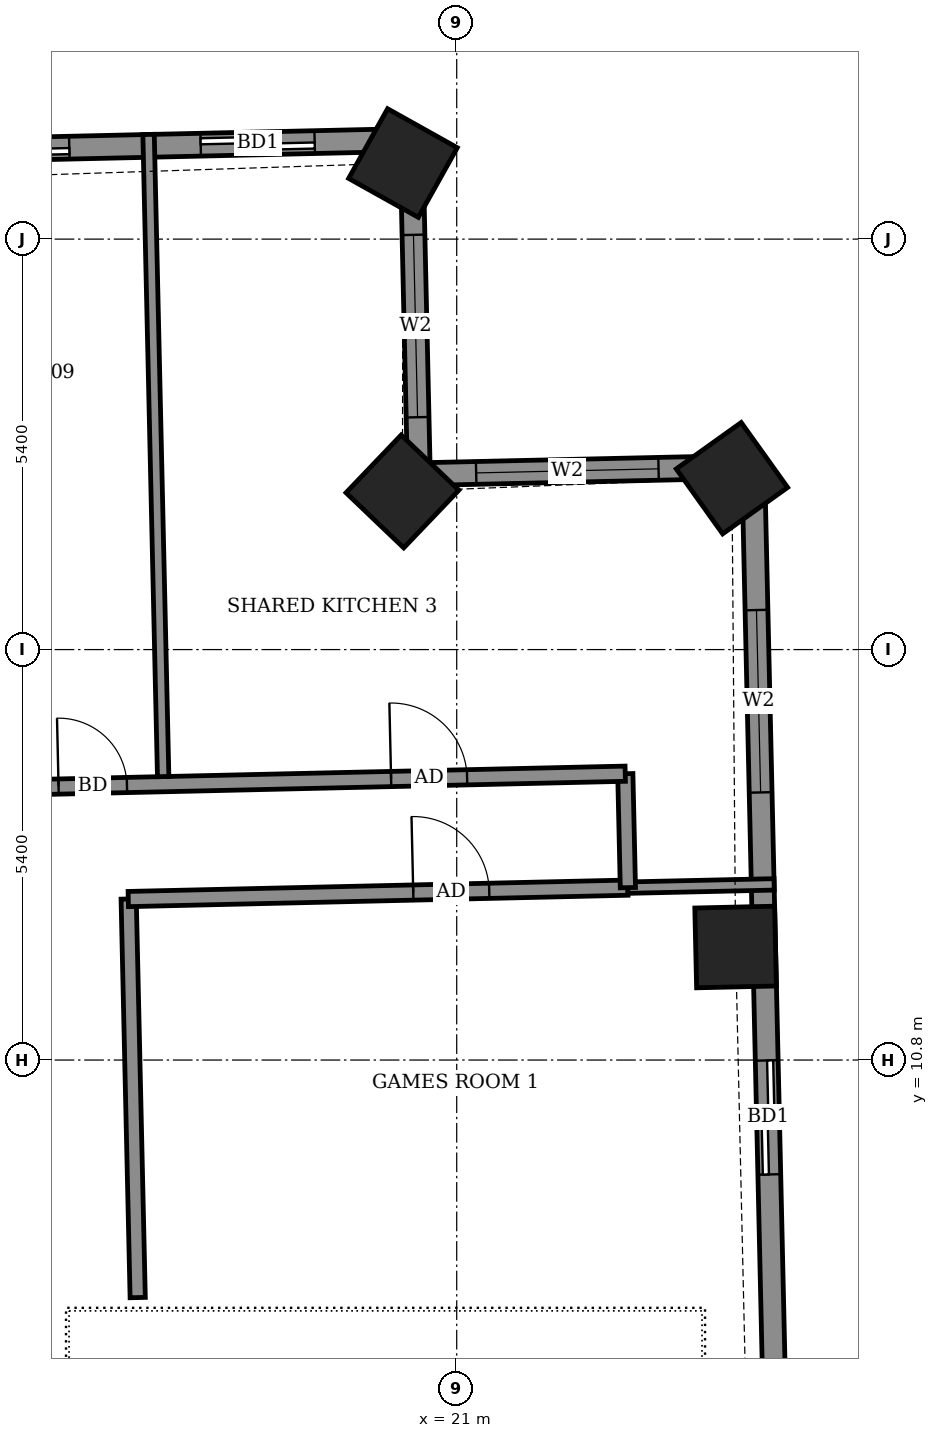
"""IFC4 building model, lengths in metres.
Left out: names, types, materials, properties, quantities, classifications, styles, units other than length and angle.
Written with IfcOpenShell. Run it as: python <this file> out.ifc"""

import sys

from ifc_helpers import new_model, si_unit, direction, frame, frame_2d, origin, origin_2d, place, context, subcontext, project, spatial, rectangle, extrude, element, fill, save


model = new_model("IFC4")
c1 = context("Model", 3, precision=1e-05, world=origin(), true_north=direction((0.0, 1.0)))
c2 = subcontext(c1, "Body", "Model", "MODEL_VIEW")
j1 = project(units=[si_unit("LENGTHUNIT", "METRE"), si_unit("PLANEANGLEUNIT", "RADIAN")], contexts=[c1])
p1 = place(None, origin())
s1 = spatial("IfcSite", under=j1, at=p1, CompositionType="ELEMENT")
p2 = place(p1, origin())
s2 = spatial("IfcBuilding", under=s1, at=p2, CompositionType="ELEMENT")
p3 = place(p2, frame((0.0, 0.0, 245.5)))
s3 = spatial("IfcBuildingStorey", under=s2, at=p3, CompositionType="ELEMENT", Elevation=245.5)
for number, where, z_axis, x_axis in (
    (1, (24.669, 12.287, -0.55), (0.0, 0.0, 1.0), (-0.023, 1.0, 0.0)),
    (2, (24.621, 18.455, -0.55), (0.0, 0.0, 1.0), (-0.581, 0.814, 0.0)),
    (3, (20.286, 18.281, -0.55), (0.0, 0.0, 1.0), (-0.723, 0.691, 0.0)),
    (4, (20.293, 22.601, -0.55), (0.0, 0.0, 1.0), (-0.873, 0.488, 0.0)),
):
    element("IfcColumn", number, at=place(p3, frame(where, z_axis=z_axis, x_axis=x_axis)), inside=s3, PredefinedType="COLUMN", context=c2, shape_type="SweptSolid", body=[
        extrude(rectangle(XDim=1.05, YDim=1.05, at=origin_2d()), origin(), (0.0, 0.0, 1.0), 3.6),
    ])
p4 = place(p3, frame((25.203, 5.31, 0.0), z_axis=(0.0, 0.0, 1.0), x_axis=(-0.022708061432, 0.999742138727, 0.0)))
e5 = element("IfcWall", 5, at=p4, inside=s3, PredefinedType="SOLIDWALL", context=c2, shape_type="SweptSolid", body=[
    extrude(rectangle(XDim=13.299, YDim=0.3, at=frame_2d((6.65, 0.0))), origin(), (0.0, 0.0, 1.0), 2.55),
])
p5 = place(p4, frame((3.986, 0.0, 0.0)))
e6 = element("IfcOpeningElement", 6, at=p5, cuts=e5, PredefinedType="OPENING", context=c2, shape_type="SweptSolid", body=[
    extrude(rectangle(XDim=1.5, YDim=2.4, at=frame_2d((0.75, 1.2))), frame((0.0, 0.16, 0.0), z_axis=(0.0, -1.0, 0.0), x_axis=(1.0, 0.0, 0.0)), (0.0, 0.0, 1.0), 0.32),
])
p6 = place(p4, frame((9.013, 0.0, 0.9)))
e7 = element("IfcOpeningElement", 7, at=p6, cuts=e5, PredefinedType="OPENING", context=c2, shape_type="SweptSolid", body=[
    extrude(rectangle(XDim=2.4, YDim=1.5, at=frame_2d((1.2, 0.75))), frame((0.0, 0.16, 0.0), z_axis=(0.0, -1.0, 0.0), x_axis=(1.0, 0.0, 0.0)), (0.0, 0.0, 1.0), 0.32),
])
p7 = place(p3, frame((24.901, 18.606, 0.0), z_axis=(0.0, 0.0, 1.0), x_axis=(-0.999747476176, -0.022471846368, 0.0)))
e8 = element("IfcWall", 8, at=p7, inside=s3, PredefinedType="SOLIDWALL", context=c2, shape_type="SweptSolid", body=[
    extrude(rectangle(XDim=4.4, YDim=0.3, at=frame_2d((2.2, 0.0))), origin(), (0.0, 0.0, 1.0), 2.55),
])
p8 = place(p7, frame((1.246, 0.0, 0.9)))
e9 = element("IfcOpeningElement", 9, at=p8, cuts=e8, PredefinedType="OPENING", context=c2, shape_type="SweptSolid", body=[
    extrude(rectangle(XDim=2.4, YDim=1.5, at=frame_2d((1.2, 0.75))), frame((0.0, 0.16, 0.0), z_axis=(0.0, -1.0, 0.0), x_axis=(1.0, 0.0, 0.0)), (0.0, 0.0, 1.0), 0.32),
])
p9 = place(p3, frame((20.502, 18.507, 0.0), z_axis=(0.0, 0.0, 1.0), x_axis=(-0.02247683371, 0.999747364061, 0.0)))
e10 = element("IfcWall", 10, at=p9, inside=s3, PredefinedType="SOLIDWALL", context=c2, shape_type="SweptSolid", body=[
    extrude(rectangle(XDim=4.399, YDim=0.3, at=frame_2d((2.2, 0.0))), origin(), (0.0, 0.0, 1.0), 2.55),
])
p10 = place(p9, frame((0.75, 0.0, 0.9)))
e11 = element("IfcOpeningElement", 11, at=p10, cuts=e10, PredefinedType="OPENING", context=c2, shape_type="SweptSolid", body=[
    extrude(rectangle(XDim=2.4, YDim=1.5, at=frame_2d((1.2, 0.75))), frame((0.0, 0.16, 0.0), z_axis=(0.0, -1.0, 0.0), x_axis=(1.0, 0.0, 0.0)), (0.0, 0.0, 1.0), 0.32),
])
p11 = place(p3, frame((20.403, 22.905, 0.0), z_axis=(0.0, 0.0, 1.0), x_axis=(-0.99974298964, -0.022670568288, 0.0)))
e12 = element("IfcWall", 12, at=p11, inside=s3, PredefinedType="SOLIDWALL", context=c2, shape_type="SweptSolid", body=[
    extrude(rectangle(XDim=44.509, YDim=0.3, at=frame_2d((22.254, 0.0))), origin(), (0.0, 0.0, 1.0), 2.5),
])
p12 = place(p11, frame((1.272, 0.0, 0.0)))
e13 = element("IfcOpeningElement", 13, at=p12, cuts=e12, PredefinedType="OPENING", context=c2, shape_type="SweptSolid", body=[
    extrude(rectangle(XDim=1.5, YDim=2.4, at=frame_2d((0.75, 1.2))), frame((0.0, 0.16, 0.0), z_axis=(0.0, -1.0, 0.0), x_axis=(1.0, 0.0, 0.0)), (0.0, 0.0, 1.0), 0.32),
])
p13 = place(p11, frame((4.501, 0.0, 0.0)))
e14 = element("IfcOpeningElement", 14, at=p13, cuts=e12, PredefinedType="OPENING", context=c2, shape_type="SweptSolid", body=[
    extrude(rectangle(XDim=1.5, YDim=2.4, at=frame_2d((0.75, 1.2))), frame((0.0, 0.16, 0.0), z_axis=(0.0, -1.0, 0.0), x_axis=(1.0, 0.0, 0.0)), (0.0, 0.0, 1.0), 0.32),
])
p14 = place(p11, frame((9.058, 0.0, 0.0)))
e15 = element("IfcOpeningElement", 15, at=p14, cuts=e12, PredefinedType="OPENING", context=c2, shape_type="SweptSolid", body=[
    extrude(rectangle(XDim=1.5, YDim=2.4, at=frame_2d((0.75, 1.2))), frame((0.0, 0.16, 0.0), z_axis=(0.0, -1.0, 0.0), x_axis=(1.0, 0.0, 0.0)), (0.0, 0.0, 1.0), 0.32),
])
p15 = place(p11, frame((12.46, 0.0, 0.0)))
e16 = element("IfcOpeningElement", 16, at=p15, cuts=e12, PredefinedType="OPENING", context=c2, shape_type="SweptSolid", body=[
    extrude(rectangle(XDim=1.5, YDim=2.4, at=frame_2d((0.75, 1.2))), frame((0.0, 0.16, 0.0), z_axis=(0.0, -1.0, 0.0), x_axis=(1.0, 0.0, 0.0)), (0.0, 0.0, 1.0), 0.32),
])
p16 = place(p11, frame((17.533, 0.0, 0.0)))
e17 = element("IfcOpeningElement", 17, at=p16, cuts=e12, PredefinedType="OPENING", context=c2, shape_type="SweptSolid", body=[
    extrude(rectangle(XDim=1.5, YDim=2.4, at=frame_2d((0.75, 1.2))), frame((0.0, 0.16, 0.0), z_axis=(0.0, -1.0, 0.0), x_axis=(1.0, 0.0, 0.0)), (0.0, 0.0, 1.0), 0.32),
])
p17 = place(p11, frame((22.993, 0.0, 0.0)))
e18 = element("IfcOpeningElement", 18, at=p17, cuts=e12, PredefinedType="OPENING", context=c2, shape_type="SweptSolid", body=[
    extrude(rectangle(XDim=1.2, YDim=2.4, at=frame_2d((0.6, 1.2))), frame((0.0, 0.16, 0.0), z_axis=(0.0, -1.0, 0.0), x_axis=(1.0, 0.0, 0.0)), (0.0, 0.0, 1.0), 0.32),
])
p18 = place(p11, frame((26.033, 0.0, 0.0)))
e19 = element("IfcOpeningElement", 19, at=p18, cuts=e12, PredefinedType="OPENING", context=c2, shape_type="SweptSolid", body=[
    extrude(rectangle(XDim=1.5, YDim=2.4, at=frame_2d((0.75, 1.2))), frame((0.0, 0.16, 0.0), z_axis=(0.0, -1.0, 0.0), x_axis=(1.0, 0.0, 0.0)), (0.0, 0.0, 1.0), 0.32),
])
p19 = place(p11, frame((30.827, 0.0, 0.0)))
e20 = element("IfcOpeningElement", 20, at=p19, cuts=e12, PredefinedType="OPENING", context=c2, shape_type="SweptSolid", body=[
    extrude(rectangle(XDim=1.5, YDim=2.4, at=frame_2d((0.75, 1.2))), frame((0.0, 0.16, 0.0), z_axis=(0.0, -1.0, 0.0), x_axis=(1.0, 0.0, 0.0)), (0.0, 0.0, 1.0), 0.32),
])
p20 = place(p11, frame((34.286, 0.0, 0.0)))
e21 = element("IfcOpeningElement", 21, at=p20, cuts=e12, PredefinedType="OPENING", context=c2, shape_type="SweptSolid", body=[
    extrude(rectangle(XDim=1.5, YDim=2.4, at=frame_2d((0.75, 1.2))), frame((0.0, 0.16, 0.0), z_axis=(0.0, -1.0, 0.0), x_axis=(1.0, 0.0, 0.0)), (0.0, 0.0, 1.0), 0.32),
])
p21 = place(p11, frame((38.811, 0.0, 0.0)))
e22 = element("IfcOpeningElement", 22, at=p21, cuts=e12, PredefinedType="OPENING", context=c2, shape_type="SweptSolid", body=[
    extrude(rectangle(XDim=1.5, YDim=2.4, at=frame_2d((0.75, 1.2))), frame((0.0, 0.16, 0.0), z_axis=(0.0, -1.0, 0.0), x_axis=(1.0, 0.0, 0.0)), (0.0, 0.0, 1.0), 0.32),
])
p22 = place(p11, frame((42.148, 0.0, 0.9)))
e23 = element("IfcOpeningElement", 23, at=p22, cuts=e12, PredefinedType="OPENING", context=c2, shape_type="SweptSolid", body=[
    extrude(rectangle(XDim=1.2, YDim=1.5, at=frame_2d((0.6, 0.75))), frame((0.0, 0.16, 0.0), z_axis=(0.0, -1.0, 0.0), x_axis=(1.0, 0.0, 0.0)), (0.0, 0.0, 1.0), 0.32),
])
p23 = place(p3, frame((16.803, 7.675, 0.0), z_axis=(0.0, 0.0, 1.0), x_axis=(-0.022667483124, 0.999743059595, 0.0)))
e24 = element("IfcWall", 24, at=p23, inside=s3, PredefinedType="PARTITIONING", context=c2, shape_type="SweptSolid", body=[
    extrude(rectangle(XDim=5.245, YDim=0.2, at=frame_2d((2.623, 0.0))), origin(), (0.0, 0.0, 1.0), 3.05),
])
p24 = place(p3, frame((16.679, 12.918, 0.0), z_axis=(0.0, 0.0, 1.0), x_axis=(0.999739125025, 0.022840356696, 0.0)))
e25 = element("IfcWall", 25, at=p24, inside=s3, PredefinedType="PARTITIONING", context=c2, shape_type="SweptSolid", body=[
    extrude(rectangle(XDim=6.574, YDim=0.2, at=frame_2d((3.287, 0.0))), origin(), (0.0, 0.0, 1.0), 3.05),
])
p25 = place(p24, frame((3.75, 0.0, 0.0)))
e26 = element("IfcOpeningElement", 26, at=p25, cuts=e25, PredefinedType="OPENING", context=c2, shape_type="SweptSolid", body=[
    extrude(rectangle(XDim=1.0, YDim=2.1, at=frame_2d((0.5, 1.05))), frame((0.0, 0.11, 0.0), z_axis=(0.0, -1.0, 0.0), x_axis=(1.0, 0.0, 0.0)), (0.0, 0.0, 1.0), 0.22),
])
p26 = place(p3, frame((23.251, 13.068, 0.0), z_axis=(0.0, 0.0, 1.0), x_axis=(0.999750982596, 0.022315304114, 0.0)))
e27 = element("IfcWall", 27, at=p26, inside=s3, PredefinedType="PARTITIONING", context=c2, shape_type="SweptSolid", body=[
    extrude(rectangle(XDim=1.926, YDim=0.15, at=frame_2d((0.963, 0.0))), origin(), (0.0, 0.0, 1.0), 2.55),
])
p27 = place(p3, frame((23.252, 13.068, 0.0), z_axis=(0.0, 0.0, 1.0), x_axis=(-0.022636322434, 0.999743765625, 0.0)))
e28 = element("IfcWall", 28, at=p27, inside=s3, PredefinedType="PARTITIONING", context=c2, shape_type="SweptSolid", body=[
    extrude(rectangle(XDim=1.499, YDim=0.2, at=frame_2d((0.75, 0.0))), origin(), (0.0, 0.0, 1.0), 3.05),
])
p28 = place(p3, frame((-27.652, 13.413, 0.0), z_axis=(0.0, 0.0, 1.0), x_axis=(0.999742864992, 0.022676064408, 0.0)))
e29 = element("IfcWall", 29, at=p28, inside=s3, PredefinedType="PARTITIONING", context=c2, shape_type="SweptSolid", body=[
    extrude(rectangle(XDim=50.882, YDim=0.2, at=frame_2d((25.441, 0.0))), origin(), (0.0, 0.0, 1.0), 3.05),
])
p29 = place(p28, frame((47.801, 0.0, 0.0)))
e30 = element("IfcOpeningElement", 30, at=p29, cuts=e29, PredefinedType="OPENING", context=c2, shape_type="SweptSolid", body=[
    extrude(rectangle(XDim=1.0, YDim=2.1, at=frame_2d((0.5, 1.05))), frame((0.0, 0.11, 0.0), z_axis=(0.0, -1.0, 0.0), x_axis=(1.0, 0.0, 0.0)), (0.0, 0.0, 1.0), 0.22),
])
p30 = place(p28, frame((43.425, 0.0, 0.0)))
e31 = element("IfcOpeningElement", 31, at=p30, cuts=e29, PredefinedType="OPENING", context=c2, shape_type="SweptSolid", body=[
    extrude(rectangle(XDim=0.9, YDim=2.1, at=frame_2d((0.45, 1.05))), frame((0.0, 0.11, 0.0), z_axis=(0.0, -1.0, 0.0), x_axis=(1.0, 0.0, 0.0)), (0.0, 0.0, 1.0), 0.22),
])
p31 = place(p28, frame((36.8, 0.0, 0.0)))
e32 = element("IfcOpeningElement", 32, at=p31, cuts=e29, PredefinedType="OPENING", context=c2, shape_type="SweptSolid", body=[
    extrude(rectangle(XDim=0.9, YDim=2.1, at=frame_2d((0.45, 1.05))), frame((0.0, 0.11, 0.0), z_axis=(0.0, -1.0, 0.0), x_axis=(1.0, 0.0, 0.0)), (0.0, 0.0, 1.0), 0.22),
])
p32 = place(p28, frame((34.975, 0.0, 0.0)))
e33 = element("IfcOpeningElement", 33, at=p32, cuts=e29, PredefinedType="OPENING", context=c2, shape_type="SweptSolid", body=[
    extrude(rectangle(XDim=0.9, YDim=2.1, at=frame_2d((0.45, 1.05))), frame((0.0, 0.11, 0.0), z_axis=(0.0, -1.0, 0.0), x_axis=(1.0, 0.0, 0.0)), (0.0, 0.0, 1.0), 0.22),
])
p33 = place(p28, frame((28.325, 0.0, 0.0)))
e34 = element("IfcOpeningElement", 34, at=p33, cuts=e29, PredefinedType="OPENING", context=c2, shape_type="SweptSolid", body=[
    extrude(rectangle(XDim=0.9, YDim=2.1, at=frame_2d((0.45, 1.05))), frame((0.0, 0.11, 0.0), z_axis=(0.0, -1.0, 0.0), x_axis=(1.0, 0.0, 0.0)), (0.0, 0.0, 1.0), 0.22),
])
p34 = place(p28, frame((26.475, 0.0, 0.0)))
e35 = element("IfcOpeningElement", 35, at=p34, cuts=e29, PredefinedType="OPENING", context=c2, shape_type="SweptSolid", body=[
    extrude(rectangle(XDim=0.9, YDim=2.1, at=frame_2d((0.45, 1.05))), frame((0.0, 0.11, 0.0), z_axis=(0.0, -1.0, 0.0), x_axis=(1.0, 0.0, 0.0)), (0.0, 0.0, 1.0), 0.22),
])
p35 = place(p28, frame((19.825, 0.0, 0.0)))
e36 = element("IfcOpeningElement", 36, at=p35, cuts=e29, PredefinedType="OPENING", context=c2, shape_type="SweptSolid", body=[
    extrude(rectangle(XDim=0.9, YDim=2.1, at=frame_2d((0.45, 1.05))), frame((0.0, 0.11, 0.0), z_axis=(0.0, -1.0, 0.0), x_axis=(1.0, 0.0, 0.0)), (0.0, 0.0, 1.0), 0.22),
])
p36 = place(p28, frame((17.975, 0.0, 0.0)))
e37 = element("IfcOpeningElement", 37, at=p36, cuts=e29, PredefinedType="OPENING", context=c2, shape_type="SweptSolid", body=[
    extrude(rectangle(XDim=0.9, YDim=2.1, at=frame_2d((0.45, 1.05))), frame((0.0, 0.11, 0.0), z_axis=(0.0, -1.0, 0.0), x_axis=(1.0, 0.0, 0.0)), (0.0, 0.0, 1.0), 0.22),
])
p37 = place(p28, frame((11.325, 0.0, 0.0)))
e38 = element("IfcOpeningElement", 38, at=p37, cuts=e29, PredefinedType="OPENING", context=c2, shape_type="SweptSolid", body=[
    extrude(rectangle(XDim=0.9, YDim=2.1, at=frame_2d((0.45, 1.05))), frame((0.0, 0.11, 0.0), z_axis=(0.0, -1.0, 0.0), x_axis=(1.0, 0.0, 0.0)), (0.0, 0.0, 1.0), 0.22),
])
p38 = place(p28, frame((9.475, 0.0, 0.0)))
e39 = element("IfcOpeningElement", 39, at=p38, cuts=e29, PredefinedType="OPENING", context=c2, shape_type="SweptSolid", body=[
    extrude(rectangle(XDim=0.9, YDim=2.1, at=frame_2d((0.45, 1.05))), frame((0.0, 0.11, 0.0), z_axis=(0.0, -1.0, 0.0), x_axis=(1.0, 0.0, 0.0)), (0.0, 0.0, 1.0), 0.22),
])
p39 = place(p28, frame((2.772, 0.0, 0.0)))
e40 = element("IfcOpeningElement", 40, at=p39, cuts=e29, PredefinedType="OPENING", context=c2, shape_type="SweptSolid", body=[
    extrude(rectangle(XDim=1.0, YDim=2.1, at=frame_2d((0.5, 1.05))), frame((0.0, 0.11, 0.0), z_axis=(0.0, -1.0, 0.0), x_axis=(1.0, 0.0, 0.0)), (0.0, 0.0, 1.0), 0.22),
])
p40 = place(p3, frame((17.138, 14.529, 0.0), z_axis=(0.0, 0.0, 1.0), x_axis=(-0.022708935798, 0.999742118866, 0.0)))
e41 = element("IfcWall", 41, at=p40, inside=s3, PredefinedType="PARTITIONING", context=c2, shape_type="SweptSolid", body=[
    extrude(rectangle(XDim=8.45, YDim=0.15, at=frame_2d((4.225, 0.0))), origin(), (0.0, 0.0, 1.0), 2.5),
])
p41 = place(p5, origin())
e42 = element("IfcDoor", 42, at=p41, inside=s3, OperationType="SLIDING_TO_LEFT", PredefinedType="DOOR", context=c2, shape_type="SweptSolid", body=[
    extrude(rectangle(XDim=1.5, YDim=2.4, at=frame_2d((0.75, 1.2))), frame((0.0, 0.025, 0.0), z_axis=(0.0, -1.0, 0.0), x_axis=(1.0, 0.0, 0.0)), (0.0, 0.0, 1.0), 0.05),
])
fill(e6, e42)
p42 = place(p6, origin())
e43 = element("IfcWindow", 43, at=p42, inside=s3, PartitioningType="DOUBLE_PANEL_VERTICAL", PredefinedType="WINDOW", context=c2, shape_type="SweptSolid", body=[
    extrude(rectangle(XDim=2.4, YDim=1.5, at=frame_2d((1.2, 0.75))), frame((0.0, 0.03, 0.0), z_axis=(0.0, -1.0, 0.0), x_axis=(1.0, 0.0, 0.0)), (0.0, 0.0, 1.0), 0.06),
])
fill(e7, e43)
p43 = place(p8, origin())
e44 = element("IfcWindow", 44, at=p43, inside=s3, PartitioningType="DOUBLE_PANEL_VERTICAL", PredefinedType="WINDOW", context=c2, shape_type="SweptSolid", body=[
    extrude(rectangle(XDim=2.4, YDim=1.5, at=frame_2d((1.2, 0.75))), frame((0.0, 0.03, 0.0), z_axis=(0.0, -1.0, 0.0), x_axis=(1.0, 0.0, 0.0)), (0.0, 0.0, 1.0), 0.06),
])
fill(e9, e44)
p44 = place(p10, origin())
e45 = element("IfcWindow", 45, at=p44, inside=s3, PartitioningType="DOUBLE_PANEL_VERTICAL", PredefinedType="WINDOW", context=c2, shape_type="SweptSolid", body=[
    extrude(rectangle(XDim=2.4, YDim=1.5, at=frame_2d((1.2, 0.75))), frame((0.0, 0.03, 0.0), z_axis=(0.0, -1.0, 0.0), x_axis=(1.0, 0.0, 0.0)), (0.0, 0.0, 1.0), 0.06),
])
fill(e11, e45)
p45 = place(p12, origin())
e46 = element("IfcDoor", 46, at=p45, inside=s3, OperationType="SLIDING_TO_LEFT", PredefinedType="DOOR", context=c2, shape_type="SweptSolid", body=[
    extrude(rectangle(XDim=1.5, YDim=2.4, at=frame_2d((0.75, 1.2))), frame((0.0, 0.025, 0.0), z_axis=(0.0, -1.0, 0.0), x_axis=(1.0, 0.0, 0.0)), (0.0, 0.0, 1.0), 0.05),
])
fill(e13, e46)
p46 = place(p13, origin())
e47 = element("IfcDoor", 47, at=p46, inside=s3, OperationType="SLIDING_TO_LEFT", PredefinedType="DOOR", context=c2, shape_type="SweptSolid", body=[
    extrude(rectangle(XDim=1.5, YDim=2.4, at=frame_2d((0.75, 1.2))), frame((0.0, 0.025, 0.0), z_axis=(0.0, -1.0, 0.0), x_axis=(1.0, 0.0, 0.0)), (0.0, 0.0, 1.0), 0.05),
])
fill(e14, e47)
p47 = place(p25, origin())
e48 = element("IfcDoor", 48, at=p47, inside=s3, OperationType="SINGLE_SWING_RIGHT", PredefinedType="DOOR", context=c2, shape_type="SweptSolid", body=[
    extrude(rectangle(XDim=1.0, YDim=2.1, at=frame_2d((0.5, 1.05))), frame((0.0, 0.025, 0.0), z_axis=(0.0, -1.0, 0.0), x_axis=(1.0, 0.0, 0.0)), (0.0, 0.0, 1.0), 0.05),
])
fill(e26, e48)
p48 = place(p29, origin())
e49 = element("IfcDoor", 49, at=p48, inside=s3, OperationType="SINGLE_SWING_LEFT", PredefinedType="DOOR", context=c2, shape_type="SweptSolid", body=[
    extrude(rectangle(XDim=1.0, YDim=2.1, at=frame_2d((0.5, 1.05))), frame((0.0, 0.025, 0.0), z_axis=(0.0, -1.0, 0.0), x_axis=(1.0, 0.0, 0.0)), (0.0, 0.0, 1.0), 0.05),
])
fill(e30, e49)
p49 = place(p30, origin())
e50 = element("IfcDoor", 50, at=p49, inside=s3, OperationType="SINGLE_SWING_LEFT", PredefinedType="DOOR", context=c2, shape_type="SweptSolid", body=[
    extrude(rectangle(XDim=0.9, YDim=2.1, at=frame_2d((0.45, 1.05))), frame((0.0, 0.025, 0.0), z_axis=(0.0, -1.0, 0.0), x_axis=(1.0, 0.0, 0.0)), (0.0, 0.0, 1.0), 0.05),
])
fill(e31, e50)
save(model, sys.argv[1])
